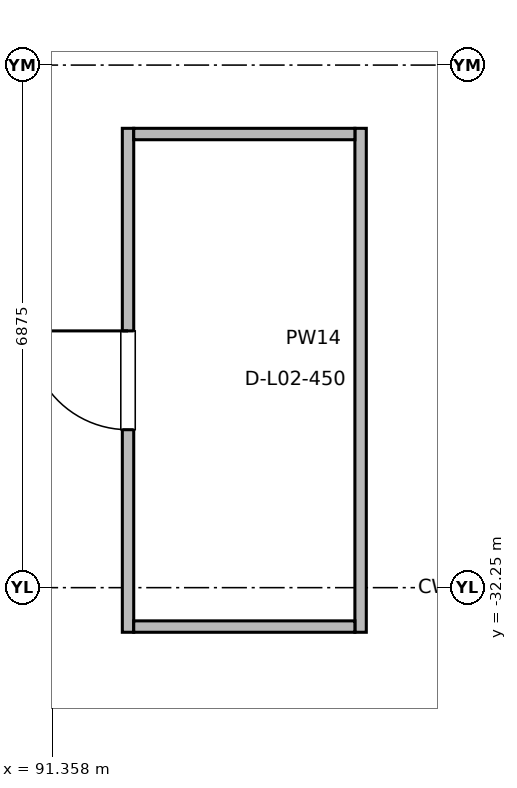
"""IFC4 building model, lengths in metres.
Left out: names, types, materials, properties, quantities, classifications, styles, units other than length and angle.
Written with IfcOpenShell. Run it as: python <this file> out.ifc"""

import sys

from ifc_helpers import new_model, si_unit, direction, frame, frame_2d, origin, place, context, subcontext, project, spatial, rectangle, extrude, element, fill, save


model = new_model("IFC4")
c1 = context("Model", 3, precision=1e-05, world=origin(), true_north=direction((0.0, 1.0)))
c2 = subcontext(c1, "Body", "Model", "MODEL_VIEW")
j1 = project(units=[si_unit("LENGTHUNIT", "METRE"), si_unit("PLANEANGLEUNIT", "RADIAN")], contexts=[c1])
p1 = place(None, origin())
s1 = spatial("IfcSite", under=j1, at=p1, CompositionType="ELEMENT")
p2 = place(p1, origin())
s2 = spatial("IfcBuilding", under=s1, at=p2, CompositionType="ELEMENT")
p3 = place(p2, frame((0.0, 0.0, 6.0)))
s3 = spatial("IfcBuildingStorey", under=s2, at=p3, CompositionType="ELEMENT", Elevation=6.0)
p4 = place(p3, frame((92.354, -32.837, 0.0), z_axis=(0.0, 0.0, 1.0), x_axis=(0.0, 1.0, 0.0)))
e1 = element("IfcWall", 1, at=p4, inside=s3, PredefinedType="PARTITIONING", context=c2, shape_type="SweptSolid", body=[
    extrude(rectangle(XDim=6.63, YDim=0.15, at=frame_2d((3.315, 0.0))), origin(), (0.0, 0.0, 1.0), 4.42),
])
p5 = place(p4, frame((2.665, 0.0, 0.0)))
e2 = element("IfcOpeningElement", 2, at=p5, cuts=e1, PredefinedType="OPENING", context=c2, shape_type="SweptSolid", body=[
    extrude(rectangle(XDim=1.3, YDim=2.3, at=frame_2d((0.65, 1.15))), frame((0.0, 0.085, 0.0), z_axis=(0.0, -1.0, 0.0), x_axis=(1.0, 0.0, 0.0)), (0.0, 0.0, 1.0), 0.17),
])
p6 = place(p3, frame((95.414, -32.837, 0.0), z_axis=(0.0, 0.0, 1.0), x_axis=(0.0, 1.0, 0.0)))
e3 = element("IfcWall", 3, at=p6, inside=s3, PredefinedType="PARTITIONING", context=c2, shape_type="SweptSolid", body=[
    extrude(rectangle(XDim=6.63, YDim=0.15, at=frame_2d((3.315, 0.0))), origin(), (0.0, 0.0, 1.0), 4.42),
])
for number, where, z_axis, x_axis in (
    (4, (92.429, -32.762, 0.0), (0.0, 0.0, 1.0), (1.0, 0.0, 0.0)),
    (5, (92.429, -26.282, 0.0), (0.0, 0.0, 1.0), (1.0, 0.0, 0.0)),
):
    element("IfcWall", number, at=place(p3, frame(where, z_axis=z_axis, x_axis=x_axis)), inside=s3, PredefinedType="PARTITIONING", context=c2, shape_type="SweptSolid", body=[
        extrude(rectangle(XDim=2.91, YDim=0.15, at=frame_2d((1.455, 0.0))), origin(), (0.0, 0.0, 1.0), 4.42),
    ])
p7 = place(p5, origin())
e6 = element("IfcDoor", 6, at=p7, inside=s3, OperationType="SINGLE_SWING_RIGHT", PredefinedType="DOOR", context=c2, shape_type="SweptSolid", body=[
    extrude(rectangle(XDim=1.3, YDim=2.3, at=frame_2d((0.65, 1.15))), frame((0.0, 0.025, 0.0), z_axis=(0.0, -1.0, 0.0), x_axis=(1.0, 0.0, 0.0)), (0.0, 0.0, 1.0), 0.05),
])
fill(e2, e6)
save(model, sys.argv[1])
